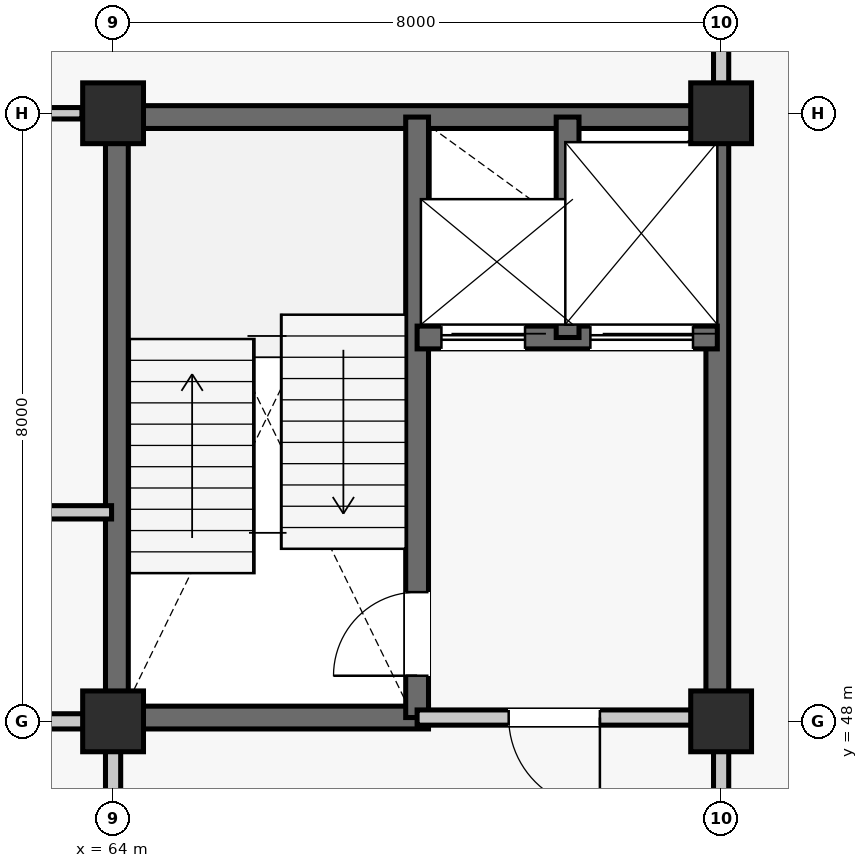
"""IFC4 building model, lengths in metres.
Left out: names, types, materials, properties, quantities, classifications, styles, units other than length and angle.
Written with IfcOpenShell. Run it as: python <this file> out.ifc"""

import sys

from ifc_helpers import new_model, si_unit, direction, frame, frame_2d, origin, origin_2d, place, context, subcontext, project, spatial, rectangle, extrude, element, fill, save


model = new_model("IFC4")
c1 = context("Model", 3, precision=1e-05, world=origin(), true_north=direction((0.0, 1.0)))
c2 = subcontext(c1, "Body", "Model", "MODEL_VIEW")
j1 = project(units=[si_unit("LENGTHUNIT", "METRE"), si_unit("PLANEANGLEUNIT", "RADIAN")], contexts=[c1])
p1 = place(None, origin())
s1 = spatial("IfcSite", under=j1, at=p1, CompositionType="ELEMENT")
p2 = place(p1, origin())
s2 = spatial("IfcBuilding", under=s1, at=p2, CompositionType="ELEMENT")
p3 = place(p2, frame((0.0, 0.0, 9.9)))
s3 = spatial("IfcBuildingStorey", under=s2, at=p3, CompositionType="ELEMENT", Elevation=9.9)
for number, where, z_axis, x_axis in (
    (1, (64.0, 48.0, 0.0), (0.0, 0.0, 1.0), (1.0, 0.0, 0.0)),
    (2, (64.0, 56.0, 0.0), (0.0, 0.0, 1.0), (1.0, 0.0, 0.0)),
    (3, (72.0, 48.0, 0.0), (0.0, 0.0, 1.0), (1.0, 0.0, 0.0)),
    (4, (72.0, 56.0, 0.0), (0.0, 0.0, 1.0), (1.0, 0.0, 0.0)),
):
    element("IfcColumn", number, at=place(p3, frame(where, z_axis=z_axis, x_axis=x_axis)), inside=s3, PredefinedType="COLUMN", context=c2, shape_type="SweptSolid", body=[
        extrude(rectangle(XDim=0.8, YDim=0.8, at=origin_2d()), origin(), (0.0, 0.0, 1.0), 3.96),
    ])
for number, where, z_axis, x_axis in (
    (5, (64.05, 48.29, 0.0), (0.0, 0.0, 1.0), (0.0, 1.0, 0.0)),
    (6, (64.29, 55.95, 0.0), (0.0, 0.0, 1.0), (1.0, 0.0, 0.0)),
    (7, (71.95, 48.29, 0.0), (0.0, 0.0, 1.0), (0.0, 1.0, 0.0)),
):
    element("IfcWall", number, at=place(p3, frame(where, z_axis=z_axis, x_axis=x_axis)), inside=s3, PredefinedType="SHEAR", context=c2, shape_type="SweptSolid", body=[
        extrude(rectangle(XDim=7.42, YDim=0.3, at=frame_2d((3.71, 0.0))), origin(), (0.0, 0.0, 1.0), 3.705),
    ])
p4 = place(p3, frame((64.29, 48.05, 0.0), z_axis=(0.0, 0.0, 1.0), x_axis=(1.0, 0.0, 0.0)))
e8 = element("IfcWall", 8, at=p4, inside=s3, PredefinedType="SHEAR", context=c2, shape_type="SweptSolid", body=[
    extrude(rectangle(XDim=3.86, YDim=0.3, at=frame_2d((1.93, 0.0))), origin(), (0.0, 0.0, 1.0), 3.705),
])
p5 = place(p3, frame((68.0, 48.05, 0.0), z_axis=(0.0, 0.0, 1.0), x_axis=(0.0, 1.0, 0.0)))
e9 = element("IfcWall", 9, at=p5, inside=s3, PredefinedType="SHEAR", context=c2, shape_type="SweptSolid", body=[
    extrude(rectangle(XDim=7.9, YDim=0.3, at=frame_2d((3.95, 0.0))), origin(), (0.0, 0.0, 1.0), 3.705),
])
p6 = place(p5, frame((0.55, 0.0, 0.0)))
e10 = element("IfcOpeningElement", 10, at=p6, cuts=e9, PredefinedType="OPENING", context=c2, shape_type="SweptSolid", body=[
    extrude(rectangle(XDim=1.1, YDim=2.15, at=frame_2d((0.55, 1.075))), frame((0.0, 0.16, 0.0), z_axis=(0.0, -1.0, 0.0), x_axis=(1.0, 0.0, 0.0)), (0.0, 0.0, 1.0), 0.32),
])
p7 = place(p3, frame((68.0, 53.05, 0.0), z_axis=(0.0, 0.0, 1.0), x_axis=(1.0, 0.0, 0.0)))
e11 = element("IfcWall", 11, at=p7, inside=s3, PredefinedType="SHEAR", context=c2, shape_type="SweptSolid", body=[
    extrude(rectangle(XDim=3.95, YDim=0.3, at=frame_2d((1.975, 0.0))), origin(), (0.0, 0.0, 1.0), 3.705),
])
p8 = place(p7, frame((0.32, 0.0, 0.0)))
e12 = element("IfcOpeningElement", 12, at=p8, cuts=e11, PredefinedType="OPENING", context=c2, shape_type="SweptSolid", body=[
    extrude(rectangle(XDim=1.1, YDim=2.2, at=frame_2d((0.55, 1.1))), frame((0.0, 0.16, 0.0), z_axis=(0.0, -1.0, 0.0), x_axis=(1.0, 0.0, 0.0)), (0.0, 0.0, 1.0), 0.32),
])
p9 = place(p7, frame((2.28, 0.0, 0.0)))
e13 = element("IfcOpeningElement", 13, at=p9, cuts=e11, PredefinedType="OPENING", context=c2, shape_type="SweptSolid", body=[
    extrude(rectangle(XDim=1.35, YDim=2.3, at=frame_2d((0.675, 1.15))), frame((0.0, 0.16, 0.0), z_axis=(0.0, -1.0, 0.0), x_axis=(1.0, 0.0, 0.0)), (0.0, 0.0, 1.0), 0.32),
])
p10 = place(p3, frame((69.98, 53.05, 0.0), z_axis=(0.0, 0.0, 1.0), x_axis=(0.0, 1.0, 0.0)))
e14 = element("IfcWall", 14, at=p10, inside=s3, PredefinedType="SHEAR", context=c2, shape_type="SweptSolid", body=[
    extrude(rectangle(XDim=2.9, YDim=0.3, at=frame_2d((1.45, 0.0))), origin(), (0.0, 0.0, 1.0), 3.705),
])
p11 = place(p3, frame((68.0, 48.05, 0.0), z_axis=(0.0, 0.0, 1.0), x_axis=(1.0, 0.0, 0.0)))
e15 = element("IfcWall", 15, at=p11, inside=s3, PredefinedType="PARTITIONING", context=c2, shape_type="SweptSolid", body=[
    extrude(rectangle(XDim=3.61, YDim=0.2, at=frame_2d((1.805, 0.0))), origin(), (0.0, 0.0, 1.0), 3.141),
])
p12 = place(p11, frame((1.205, 0.0, 0.0)))
e16 = element("IfcOpeningElement", 16, at=p12, cuts=e15, PredefinedType="OPENING", context=c2, shape_type="SweptSolid", body=[
    extrude(rectangle(XDim=1.2, YDim=2.15, at=frame_2d((0.6, 1.075))), frame((0.0, 0.11, 0.0), z_axis=(0.0, -1.0, 0.0), x_axis=(1.0, 0.0, 0.0)), (0.0, 0.0, 1.0), 0.22),
])
p13 = place(p3, frame((58.7, 50.75, 0.0), z_axis=(0.0, 0.0, 1.0), x_axis=(1.0, 0.0, 0.0)))
e17 = element("IfcWall", 17, at=p13, inside=s3, PredefinedType="PARTITIONING", context=c2, shape_type="SweptSolid", body=[
    extrude(rectangle(XDim=5.28, YDim=0.175, at=frame_2d((2.64, 0.0))), origin(), (0.0, 0.0, 1.0), 3.151),
])
p14 = place(p13, frame((2.15, 0.0, 0.0)))
e18 = element("IfcOpeningElement", 18, at=p14, cuts=e17, PredefinedType="OPENING", context=c2, shape_type="SweptSolid", body=[
    extrude(rectangle(XDim=0.98, YDim=2.15, at=frame_2d((0.49, 1.075))), frame((0.0, 0.097, 0.0), z_axis=(0.0, -1.0, 0.0), x_axis=(1.0, 0.0, 0.0)), (0.0, 0.0, 1.0), 0.195),
])
p15 = place(p3, frame((58.75, 56.0, 0.0), z_axis=(0.0, 0.0, 1.0), x_axis=(1.0, 0.0, 0.0)))
e19 = element("IfcWall", 19, at=p15, inside=s3, PredefinedType="PARTITIONING", context=c2, shape_type="SweptSolid", body=[
    extrude(rectangle(XDim=4.84, YDim=0.15, at=frame_2d((2.42, 0.0))), origin(), (0.0, 0.0, 1.0), 3.141),
])
p16 = place(p3, frame((64.0, 40.29, 0.0), z_axis=(0.0, 0.0, 1.0), x_axis=(0.0, 1.0, 0.0)))
e20 = element("IfcWall", 20, at=p16, inside=s3, PredefinedType="PARTITIONING", context=c2, shape_type="SweptSolid", body=[
    extrude(rectangle(XDim=7.32, YDim=0.2, at=frame_2d((3.66, 0.0))), origin(), (0.0, 0.0, 1.0), 3.227),
])
p17 = place(p16, frame((3.2, 0.0, 0.0)))
e21 = element("IfcOpeningElement", 21, at=p17, cuts=e20, PredefinedType="OPENING", context=c2, shape_type="SweptSolid", body=[
    extrude(rectangle(XDim=0.92, YDim=2.1, at=frame_2d((0.46, 1.05))), frame((0.0, 0.11, 0.0), z_axis=(0.0, -1.0, 0.0), x_axis=(1.0, 0.0, 0.0)), (0.0, 0.0, 1.0), 0.22),
])
p18 = place(p3, frame((56.29, 48.0, 0.0), z_axis=(0.0, 0.0, 1.0), x_axis=(1.0, 0.0, 0.0)))
e22 = element("IfcWall", 22, at=p18, inside=s3, PredefinedType="PARTITIONING", context=c2, shape_type="SweptSolid", body=[
    extrude(rectangle(XDim=7.32, YDim=0.2, at=frame_2d((3.66, 0.0))), origin(), (0.0, 0.0, 1.0), 3.157),
])
p19 = place(p3, frame((72.0, 40.39, 0.0), z_axis=(0.0, 0.0, 1.0), x_axis=(0.0, 1.0, 0.0)))
e23 = element("IfcWall", 23, at=p19, inside=s3, PredefinedType="PARTITIONING", context=c2, shape_type="SweptSolid", body=[
    extrude(rectangle(XDim=7.22, YDim=0.2, at=frame_2d((3.61, 0.0))), origin(), (0.0, 0.0, 1.0), 3.151),
])
p20 = place(p19, frame((2.81, 0.0, 0.0)))
e24 = element("IfcOpeningElement", 24, at=p20, cuts=e23, PredefinedType="OPENING", context=c2, shape_type="SweptSolid", body=[
    extrude(rectangle(XDim=1.6, YDim=2.25, at=frame_2d((0.8, 1.125))), frame((0.0, 0.11, 0.0), z_axis=(0.0, -1.0, 0.0), x_axis=(1.0, 0.0, 0.0)), (0.0, 0.0, 1.0), 0.22),
])
p21 = place(p3, frame((72.0, 56.39, 0.0), z_axis=(0.0, 0.0, 1.0), x_axis=(0.0, 1.0, 0.0)))
e25 = element("IfcWall", 25, at=p21, inside=s3, PredefinedType="PARTITIONING", context=c2, shape_type="SweptSolid", body=[
    extrude(rectangle(XDim=7.22, YDim=0.2, at=frame_2d((3.61, 0.0))), origin(), (0.0, 0.0, 1.0), 3.157),
])
p22 = place(p21, frame((0.52, 0.0, 0.0)))
e26 = element("IfcOpeningElement", 26, at=p22, cuts=e25, PredefinedType="OPENING", context=c2, shape_type="SweptSolid", body=[
    extrude(rectangle(XDim=0.94, YDim=2.12, at=frame_2d((0.47, 1.06))), frame((0.0, 0.11, 0.0), z_axis=(0.0, -1.0, 0.0), x_axis=(1.0, 0.0, 0.0)), (0.0, 0.0, 1.0), 0.22),
])
p23 = place(p6, origin())
e27 = element("IfcDoor", 27, at=p23, inside=s3, OperationType="SINGLE_SWING_LEFT", PredefinedType="DOOR", context=c2, shape_type="SweptSolid", body=[
    extrude(rectangle(XDim=1.1, YDim=2.15, at=frame_2d((0.55, 1.075))), frame((0.0, 0.025, 0.0), z_axis=(0.0, -1.0, 0.0), x_axis=(1.0, 0.0, 0.0)), (0.0, 0.0, 1.0), 0.05),
])
fill(e10, e27)
p24 = place(p8, origin())
e28 = element("IfcDoor", 28, at=p24, inside=s3, OperationType="SLIDING_TO_LEFT", PredefinedType="DOOR", context=c2, shape_type="SweptSolid", body=[
    extrude(rectangle(XDim=1.1, YDim=2.2, at=frame_2d((0.55, 1.1))), frame((0.0, 0.025, 0.0), z_axis=(0.0, -1.0, 0.0), x_axis=(1.0, 0.0, 0.0)), (0.0, 0.0, 1.0), 0.05),
])
fill(e12, e28)
p25 = place(p9, origin())
e29 = element("IfcDoor", 29, at=p25, inside=s3, OperationType="DOUBLE_DOOR_SLIDING", PredefinedType="DOOR", context=c2, shape_type="SweptSolid", body=[
    extrude(rectangle(XDim=1.35, YDim=2.3, at=frame_2d((0.675, 1.15))), frame((0.0, 0.025, 0.0), z_axis=(0.0, -1.0, 0.0), x_axis=(1.0, 0.0, 0.0)), (0.0, 0.0, 1.0), 0.05),
])
fill(e13, e29)
p26 = place(p12, frame((1.2, 0.0, 0.0), z_axis=(0.0, 0.0, 1.0), x_axis=(-1.0, 0.0, 0.0)))
e30 = element("IfcDoor", 30, at=p26, inside=s3, OperationType="SINGLE_SWING_RIGHT", PredefinedType="DOOR", context=c2, shape_type="SweptSolid", body=[
    extrude(rectangle(XDim=1.2, YDim=2.15, at=frame_2d((0.6, 1.075))), frame((0.0, 0.025, 0.0), z_axis=(0.0, -1.0, 0.0), x_axis=(1.0, 0.0, 0.0)), (0.0, 0.0, 1.0), 0.05),
])
fill(e16, e30)
save(model, sys.argv[1])
